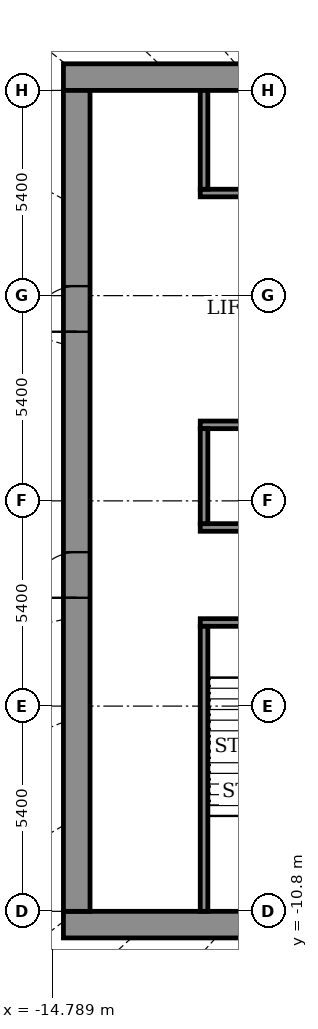
"""IFC4 building model, lengths in metres.
Left out: names, types, materials, properties, quantities, classifications, styles, units other than length and angle.
Written with IfcOpenShell. Run it as: python <this file> out.ifc"""

import sys

from ifc_helpers import new_model, si_unit, direction, frame, frame_2d, origin, place, context, subcontext, project, spatial, rectangle, extrude, element, fill, save


model = new_model("IFC4")
c1 = context("Model", 3, precision=1e-05, world=origin(), true_north=direction((0.0, 1.0)))
c2 = subcontext(c1, "Body", "Model", "MODEL_VIEW")
j1 = project(units=[si_unit("LENGTHUNIT", "METRE"), si_unit("PLANEANGLEUNIT", "RADIAN")], contexts=[c1])
p1 = place(None, origin())
s1 = spatial("IfcSite", under=j1, at=p1, CompositionType="ELEMENT")
p2 = place(p1, origin())
s2 = spatial("IfcBuilding", under=s1, at=p2, CompositionType="ELEMENT")
p3 = place(p2, frame((0.0, 0.0, 275.3)))
s3 = spatial("IfcBuildingStorey", under=s2, at=p3, CompositionType="ELEMENT", Elevation=275.3)
for number, where, z_axis, x_axis in (
    (1, (-14.5, -11.15, 0.0), (0.0, 0.0, 1.0), (1.0, 0.0, 0.0)),
    (2, (-14.5, 11.15, 0.0), (0.0, 0.0, 1.0), (1.0, 0.0, 0.0)),
):
    element("IfcWall", number, at=place(p3, frame(where, z_axis=z_axis, x_axis=x_axis)), inside=s3, PredefinedType="SHEAR", context=c2, shape_type="SweptSolid", body=[
        extrude(rectangle(XDim=29.0, YDim=0.7, at=frame_2d((14.5, 0.0))), origin(), (0.0, 0.0, 1.0), 4.6),
    ])
p4 = place(p3, frame((-14.15, -10.8, 0.0), z_axis=(0.0, 0.0, 1.0), x_axis=(0.0, 1.0, 0.0)))
e3 = element("IfcWall", 3, at=p4, inside=s3, PredefinedType="SHEAR", context=c2, shape_type="SweptSolid", body=[
    extrude(rectangle(XDim=21.6, YDim=0.7, at=frame_2d((10.8, 0.0))), origin(), (0.0, 0.0, 1.0), 4.6),
])
p5 = place(p4, frame((8.25, 0.0, 0.0)))
e4 = element("IfcOpeningElement", 4, at=p5, cuts=e3, PredefinedType="OPENING", context=c2, shape_type="SweptSolid", body=[
    extrude(rectangle(XDim=1.2, YDim=2.1, at=frame_2d((0.6, 1.05))), frame((0.0, 0.36, 0.0), z_axis=(0.0, -1.0, 0.0), x_axis=(1.0, 0.0, 0.0)), (0.0, 0.0, 1.0), 0.72),
])
p6 = place(p4, frame((15.25, 0.0, 0.0)))
e5 = element("IfcOpeningElement", 5, at=p6, cuts=e3, PredefinedType="OPENING", context=c2, shape_type="SweptSolid", body=[
    extrude(rectangle(XDim=1.2, YDim=2.1, at=frame_2d((0.6, 1.05))), frame((0.0, 0.36, 0.0), z_axis=(0.0, -1.0, 0.0), x_axis=(1.0, 0.0, 0.0)), (0.0, 0.0, 1.0), 0.72),
])
p7 = place(p3, frame((-10.9, -3.2, 0.0), z_axis=(0.0, 0.0, 1.0), x_axis=(1.0, 0.0, 0.0)))
e6 = element("IfcWall", 6, at=p7, inside=s3, PredefinedType="SHEAR", context=c2, shape_type="SweptSolid", body=[
    extrude(rectangle(XDim=21.8, YDim=0.2, at=frame_2d((10.9, 0.0))), origin(), (0.0, 0.0, 1.0), 4.05),
])
p8 = place(p7, frame((1.075, 0.0, 0.0)))
e7 = element("IfcOpeningElement", 7, at=p8, cuts=e6, PredefinedType="OPENING", context=c2, shape_type="SweptSolid", body=[
    extrude(rectangle(XDim=1.1, YDim=2.1, at=frame_2d((0.55, 1.05))), frame((0.0, 0.11, 0.0), z_axis=(0.0, -1.0, 0.0), x_axis=(1.0, 0.0, 0.0)), (0.0, 0.0, 1.0), 0.22),
])
p9 = place(p7, frame((10.325, 0.0, 0.0)))
e8 = element("IfcOpeningElement", 8, at=p9, cuts=e6, PredefinedType="OPENING", context=c2, shape_type="SweptSolid", body=[
    extrude(rectangle(XDim=1.1, YDim=2.1, at=frame_2d((0.55, 1.05))), frame((0.0, 0.11, 0.0), z_axis=(0.0, -1.0, 0.0), x_axis=(1.0, 0.0, 0.0)), (0.0, 0.0, 1.0), 0.22),
])
p10 = place(p7, frame((19.625, 0.0, 0.0)))
e9 = element("IfcOpeningElement", 9, at=p10, cuts=e6, PredefinedType="OPENING", context=c2, shape_type="SweptSolid", body=[
    extrude(rectangle(XDim=1.1, YDim=2.1, at=frame_2d((0.55, 1.05))), frame((0.0, 0.11, 0.0), z_axis=(0.0, -1.0, 0.0), x_axis=(1.0, 0.0, 0.0)), (0.0, 0.0, 1.0), 0.22),
])
p11 = place(p7, frame((5.7, 0.0, 0.0)))
e10 = element("IfcOpeningElement", 10, at=p11, cuts=e6, PredefinedType="OPENING", context=c2, shape_type="SweptSolid", body=[
    extrude(rectangle(XDim=1.1, YDim=2.1, at=frame_2d((0.55, 1.05))), frame((0.0, 0.11, 0.0), z_axis=(0.0, -1.0, 0.0), x_axis=(1.0, 0.0, 0.0)), (0.0, 0.0, 1.0), 0.22),
])
p12 = place(p7, frame((14.975, 0.0, 0.0)))
e11 = element("IfcOpeningElement", 11, at=p12, cuts=e6, PredefinedType="OPENING", context=c2, shape_type="SweptSolid", body=[
    extrude(rectangle(XDim=1.1, YDim=2.1, at=frame_2d((0.55, 1.05))), frame((0.0, 0.11, 0.0), z_axis=(0.0, -1.0, 0.0), x_axis=(1.0, 0.0, 0.0)), (0.0, 0.0, 1.0), 0.22),
])
p13 = place(p3, frame((-10.9, -0.7, 0.0), z_axis=(0.0, 0.0, 1.0), x_axis=(1.0, 0.0, 0.0)))
e12 = element("IfcWall", 12, at=p13, inside=s3, PredefinedType="SHEAR", context=c2, shape_type="SweptSolid", body=[
    extrude(rectangle(XDim=21.8, YDim=0.2, at=frame_2d((10.9, 0.0))), origin(), (0.0, 0.0, 1.0), 4.05),
])
p14 = place(p3, frame((-10.9, 2.0, 0.0), z_axis=(0.0, 0.0, 1.0), x_axis=(1.0, 0.0, 0.0)))
e13 = element("IfcWall", 13, at=p14, inside=s3, PredefinedType="SHEAR", context=c2, shape_type="SweptSolid", body=[
    extrude(rectangle(XDim=21.8, YDim=0.2, at=frame_2d((10.9, 0.0))), origin(), (0.0, 0.0, 1.0), 4.05),
])
p15 = place(p14, frame((4.95, 0.0, 0.0)))
e14 = element("IfcOpeningElement", 14, at=p15, cuts=e13, PredefinedType="OPENING", context=c2, shape_type="SweptSolid", body=[
    extrude(rectangle(XDim=1.1, YDim=2.1, at=frame_2d((0.55, 1.05))), frame((0.0, 0.11, 0.0), z_axis=(0.0, -1.0, 0.0), x_axis=(1.0, 0.0, 0.0)), (0.0, 0.0, 1.0), 0.22),
])
p16 = place(p14, frame((7.65, 0.0, 0.0)))
e15 = element("IfcOpeningElement", 15, at=p16, cuts=e13, PredefinedType="OPENING", context=c2, shape_type="SweptSolid", body=[
    extrude(rectangle(XDim=1.1, YDim=2.1, at=frame_2d((0.55, 1.05))), frame((0.0, 0.11, 0.0), z_axis=(0.0, -1.0, 0.0), x_axis=(1.0, 0.0, 0.0)), (0.0, 0.0, 1.0), 0.22),
])
p17 = place(p14, frame((10.35, 0.0, 0.0)))
e16 = element("IfcOpeningElement", 16, at=p17, cuts=e13, PredefinedType="OPENING", context=c2, shape_type="SweptSolid", body=[
    extrude(rectangle(XDim=1.1, YDim=2.1, at=frame_2d((0.55, 1.05))), frame((0.0, 0.11, 0.0), z_axis=(0.0, -1.0, 0.0), x_axis=(1.0, 0.0, 0.0)), (0.0, 0.0, 1.0), 0.22),
])
p18 = place(p14, frame((1.675, 0.0, 0.0)))
e17 = element("IfcOpeningElement", 17, at=p18, cuts=e13, PredefinedType="OPENING", context=c2, shape_type="SweptSolid", body=[
    extrude(rectangle(XDim=0.9, YDim=2.1, at=frame_2d((0.45, 1.05))), frame((0.0, 0.11, 0.0), z_axis=(0.0, -1.0, 0.0), x_axis=(1.0, 0.0, 0.0)), (0.0, 0.0, 1.0), 0.22),
])
p19 = place(p14, frame((14.5, 0.0, 0.0)))
e18 = element("IfcOpeningElement", 18, at=p19, cuts=e13, PredefinedType="OPENING", context=c2, shape_type="SweptSolid", body=[
    extrude(rectangle(XDim=0.9, YDim=2.1, at=frame_2d((0.45, 1.05))), frame((0.0, 0.11, 0.0), z_axis=(0.0, -1.0, 0.0), x_axis=(1.0, 0.0, 0.0)), (0.0, 0.0, 1.0), 0.22),
])
p20 = place(p14, frame((19.225, 0.0, 0.0)))
e19 = element("IfcOpeningElement", 19, at=p20, cuts=e13, PredefinedType="OPENING", context=c2, shape_type="SweptSolid", body=[
    extrude(rectangle(XDim=0.9, YDim=2.1, at=frame_2d((0.45, 1.05))), frame((0.0, 0.11, 0.0), z_axis=(0.0, -1.0, 0.0), x_axis=(1.0, 0.0, 0.0)), (0.0, 0.0, 1.0), 0.22),
])
p21 = place(p3, frame((-10.9, 8.1, 0.0), z_axis=(0.0, 0.0, 1.0), x_axis=(1.0, 0.0, 0.0)))
e20 = element("IfcWall", 20, at=p21, inside=s3, PredefinedType="SHEAR", context=c2, shape_type="SweptSolid", body=[
    extrude(rectangle(XDim=21.8, YDim=0.2, at=frame_2d((10.9, 0.0))), origin(), (0.0, 0.0, 1.0), 4.05),
])
p22 = place(p21, frame((4.95, 0.0, 0.0)))
e21 = element("IfcOpeningElement", 21, at=p22, cuts=e20, PredefinedType="OPENING", context=c2, shape_type="SweptSolid", body=[
    extrude(rectangle(XDim=1.1, YDim=2.1, at=frame_2d((0.55, 1.05))), frame((0.0, 0.11, 0.0), z_axis=(0.0, -1.0, 0.0), x_axis=(1.0, 0.0, 0.0)), (0.0, 0.0, 1.0), 0.22),
])
p23 = place(p21, frame((7.65, 0.0, 0.0)))
e22 = element("IfcOpeningElement", 22, at=p23, cuts=e20, PredefinedType="OPENING", context=c2, shape_type="SweptSolid", body=[
    extrude(rectangle(XDim=1.1, YDim=2.1, at=frame_2d((0.55, 1.05))), frame((0.0, 0.11, 0.0), z_axis=(0.0, -1.0, 0.0), x_axis=(1.0, 0.0, 0.0)), (0.0, 0.0, 1.0), 0.22),
])
p24 = place(p21, frame((10.35, 0.0, 0.0)))
e23 = element("IfcOpeningElement", 23, at=p24, cuts=e20, PredefinedType="OPENING", context=c2, shape_type="SweptSolid", body=[
    extrude(rectangle(XDim=1.1, YDim=2.1, at=frame_2d((0.55, 1.05))), frame((0.0, 0.11, 0.0), z_axis=(0.0, -1.0, 0.0), x_axis=(1.0, 0.0, 0.0)), (0.0, 0.0, 1.0), 0.22),
])
p25 = place(p21, frame((1.675, 0.0, 0.0)))
e24 = element("IfcOpeningElement", 24, at=p25, cuts=e20, PredefinedType="OPENING", context=c2, shape_type="SweptSolid", body=[
    extrude(rectangle(XDim=0.9, YDim=2.1, at=frame_2d((0.45, 1.05))), frame((0.0, 0.11, 0.0), z_axis=(0.0, -1.0, 0.0), x_axis=(1.0, 0.0, 0.0)), (0.0, 0.0, 1.0), 0.22),
])
p26 = place(p21, frame((14.5, 0.0, 0.0)))
e25 = element("IfcOpeningElement", 25, at=p26, cuts=e20, PredefinedType="OPENING", context=c2, shape_type="SweptSolid", body=[
    extrude(rectangle(XDim=0.9, YDim=2.1, at=frame_2d((0.45, 1.05))), frame((0.0, 0.11, 0.0), z_axis=(0.0, -1.0, 0.0), x_axis=(1.0, 0.0, 0.0)), (0.0, 0.0, 1.0), 0.22),
])
p27 = place(p21, frame((19.225, 0.0, 0.0)))
e26 = element("IfcOpeningElement", 26, at=p27, cuts=e20, PredefinedType="OPENING", context=c2, shape_type="SweptSolid", body=[
    extrude(rectangle(XDim=0.9, YDim=2.1, at=frame_2d((0.45, 1.05))), frame((0.0, 0.11, 0.0), z_axis=(0.0, -1.0, 0.0), x_axis=(1.0, 0.0, 0.0)), (0.0, 0.0, 1.0), 0.22),
])
p28 = place(p3, frame((-10.8, -10.8, 0.0), z_axis=(0.0, 0.0, 1.0), x_axis=(0.0, 1.0, 0.0)))
e27 = element("IfcWall", 27, at=p28, inside=s3, PredefinedType="SHEAR", context=c2, shape_type="SweptSolid", body=[
    extrude(rectangle(XDim=7.5, YDim=0.2, at=frame_2d((3.75, 0.0))), origin(), (0.0, 0.0, 1.0), 4.05),
])
p29 = place(p3, frame((-10.8, -0.6, 0.0), z_axis=(0.0, 0.0, 1.0), x_axis=(0.0, 1.0, 0.0)))
e28 = element("IfcWall", 28, at=p29, inside=s3, PredefinedType="STANDARD", context=c2, shape_type="SweptSolid", body=[
    extrude(rectangle(XDim=2.5, YDim=0.2, at=frame_2d((1.25, 0.0))), origin(), (0.0, 0.0, 1.0), 4.05),
])
p30 = place(p3, frame((-10.8, 8.2, 0.0), z_axis=(0.0, 0.0, 1.0), x_axis=(0.0, 1.0, 0.0)))
e29 = element("IfcWall", 29, at=p30, inside=s3, PredefinedType="STANDARD", context=c2, shape_type="SweptSolid", body=[
    extrude(rectangle(XDim=2.6, YDim=0.2, at=frame_2d((1.3, 0.0))), origin(), (0.0, 0.0, 1.0), 4.05),
])
p31 = place(p5, origin())
e30 = element("IfcDoor", 30, at=p31, inside=s3, OperationType="DOUBLE_DOOR_SINGLE_SWING", PredefinedType="DOOR", context=c2, shape_type="SweptSolid", body=[
    extrude(rectangle(XDim=1.2, YDim=2.1, at=frame_2d((0.6, 1.05))), frame((0.0, 0.025, 0.0), z_axis=(0.0, -1.0, 0.0), x_axis=(1.0, 0.0, 0.0)), (0.0, 0.0, 1.0), 0.05),
])
fill(e4, e30)
p32 = place(p6, origin())
e31 = element("IfcDoor", 31, at=p32, inside=s3, OperationType="DOUBLE_DOOR_SINGLE_SWING", PredefinedType="DOOR", context=c2, shape_type="SweptSolid", body=[
    extrude(rectangle(XDim=1.2, YDim=2.1, at=frame_2d((0.6, 1.05))), frame((0.0, 0.025, 0.0), z_axis=(0.0, -1.0, 0.0), x_axis=(1.0, 0.0, 0.0)), (0.0, 0.0, 1.0), 0.05),
])
fill(e5, e31)
save(model, sys.argv[1])
